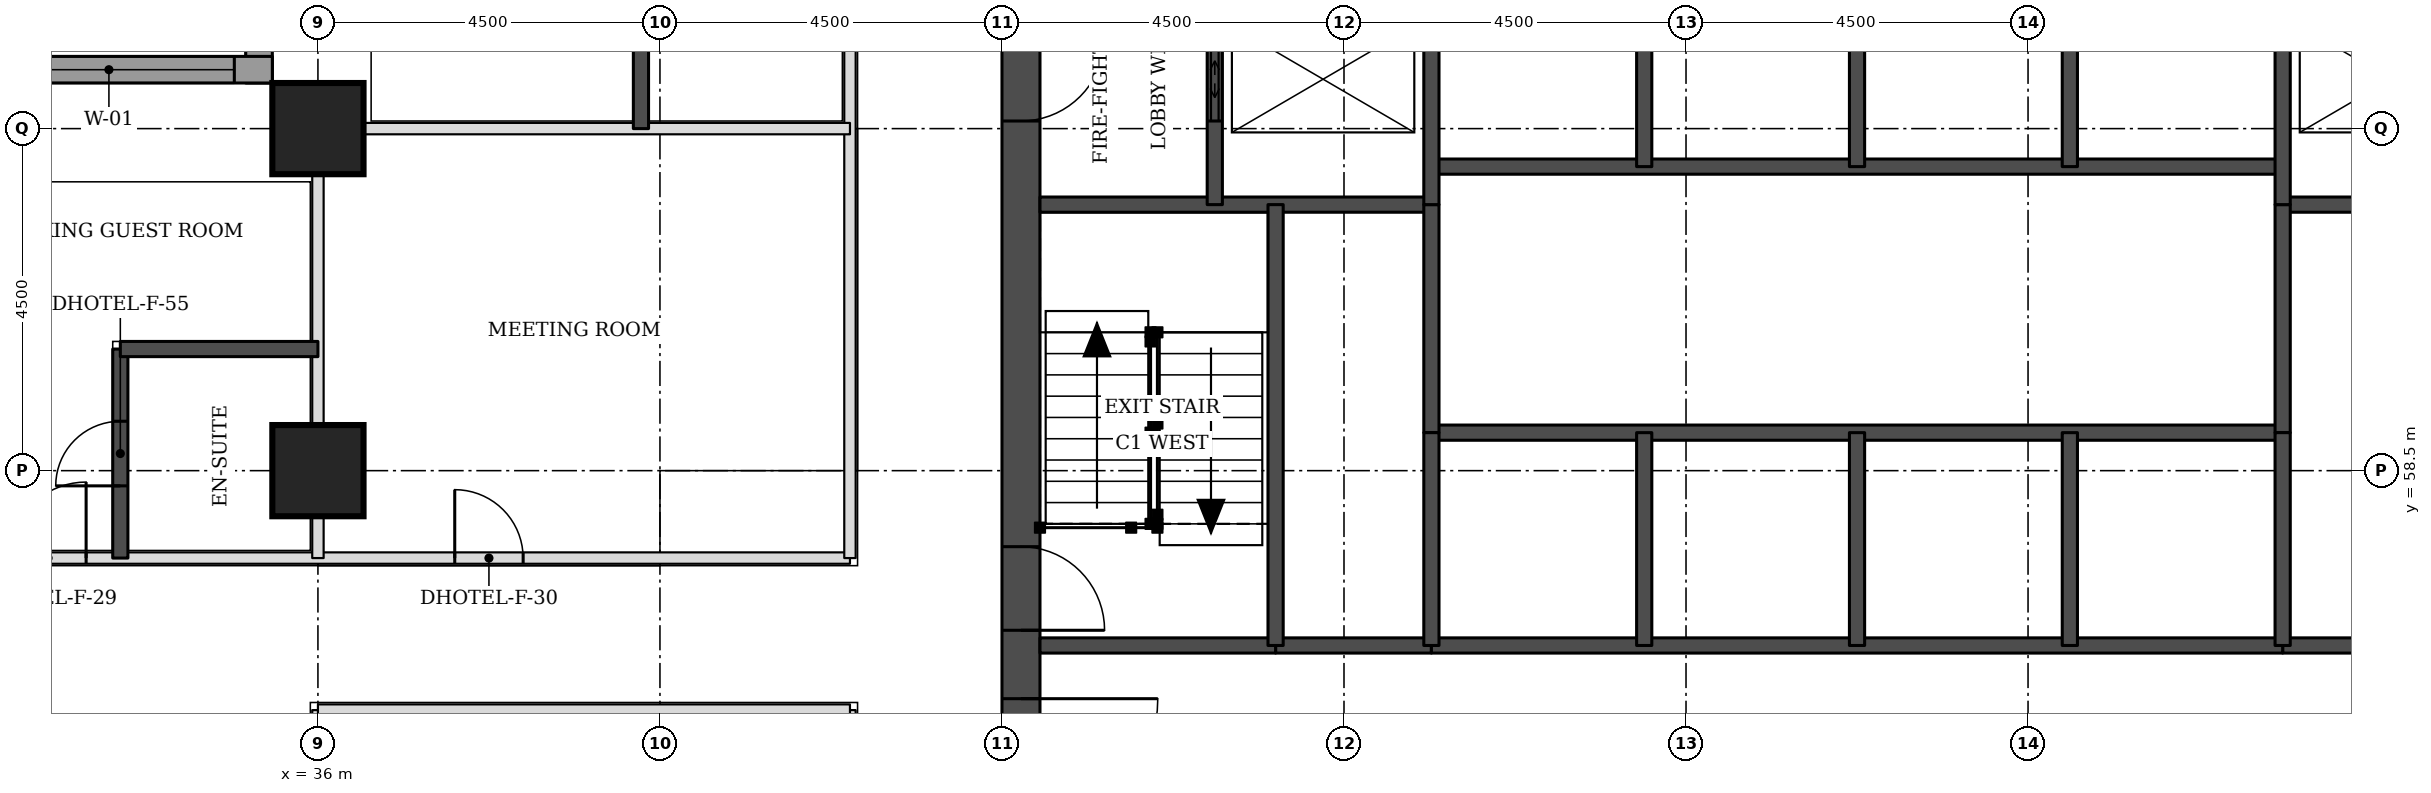
"""IFC4 building model, lengths in metres.
Left out: names, types, materials, properties, quantities, classifications, styles, units other than length and angle.
Written with IfcOpenShell. Run it as: python <this file> out.ifc"""

import sys

from ifc_helpers import new_model, si_unit, direction, frame, frame_2d, origin, origin_2d, place, context, subcontext, project, spatial, rectangle, extrude, element, fill, save


model = new_model("IFC4")
c1 = context("Model", 3, precision=1e-05, world=origin(), true_north=direction((0.0, 1.0)))
c2 = subcontext(c1, "Body", "Model", "MODEL_VIEW")
j1 = project(units=[si_unit("LENGTHUNIT", "METRE"), si_unit("PLANEANGLEUNIT", "RADIAN")], contexts=[c1])
p1 = place(None, origin())
s1 = spatial("IfcSite", under=j1, at=p1, CompositionType="ELEMENT")
p2 = place(p1, origin())
s2 = spatial("IfcBuilding", under=s1, at=p2, CompositionType="ELEMENT")
p3 = place(p2, frame((0.0, 0.0, 42.9)))
s3 = spatial("IfcBuildingStorey", under=s2, at=p3, CompositionType="ELEMENT", Elevation=42.9)
for number, where, z_axis, x_axis in (
    (1, (36.0, 58.5, 0.0), (0.0, 0.0, 1.0), (1.0, 0.0, 0.0)),
    (2, (36.0, 63.0, 0.0), (0.0, 0.0, 1.0), (1.0, 0.0, 0.0)),
):
    element("IfcColumn", number, at=place(p3, frame(where, z_axis=z_axis, x_axis=x_axis)), inside=s3, PredefinedType="COLUMN", context=c2, shape_type="SweptSolid", body=[
        extrude(rectangle(XDim=1.2, YDim=1.2, at=origin_2d()), origin(), (0.0, 0.0, 1.0), 3.3),
    ])
p4 = place(p3, frame((45.25, 49.5, 0.0), z_axis=(0.0, 0.0, 1.0), x_axis=(0.0, 1.0, 0.0)))
e3 = element("IfcWall", 3, at=p4, inside=s3, PredefinedType="SHEAR", context=c2, shape_type="SweptSolid", body=[
    extrude(rectangle(XDim=22.5, YDim=0.5, at=frame_2d((11.25, 0.0))), origin(), (0.0, 0.0, 1.0), 3.3),
])
p5 = place(p4, frame((4.2, 0.0, 0.0)))
e4 = element("IfcOpeningElement", 4, at=p5, cuts=e3, PredefinedType="OPENING", context=c2, shape_type="SweptSolid", body=[
    extrude(rectangle(XDim=1.8, YDim=2.1, at=frame_2d((0.9, 1.05))), frame((0.0, 0.26, 0.0), z_axis=(0.0, -1.0, 0.0), x_axis=(1.0, 0.0, 0.0)), (0.0, 0.0, 1.0), 0.52),
])
p6 = place(p4, frame((6.9, 0.0, 0.0)))
e5 = element("IfcOpeningElement", 5, at=p6, cuts=e3, PredefinedType="OPENING", context=c2, shape_type="SweptSolid", body=[
    extrude(rectangle(XDim=1.1, YDim=2.1, at=frame_2d((0.55, 1.05))), frame((0.0, 0.26, 0.0), z_axis=(0.0, -1.0, 0.0), x_axis=(1.0, 0.0, 0.0)), (0.0, 0.0, 1.0), 0.52),
])
p7 = place(p4, frame((13.6, 0.0, 0.0)))
e6 = element("IfcOpeningElement", 6, at=p7, cuts=e3, PredefinedType="OPENING", context=c2, shape_type="SweptSolid", body=[
    extrude(rectangle(XDim=1.1, YDim=2.1, at=frame_2d((0.55, 1.05))), frame((0.0, 0.26, 0.0), z_axis=(0.0, -1.0, 0.0), x_axis=(1.0, 0.0, 0.0)), (0.0, 0.0, 1.0), 0.52),
])
p8 = place(p4, frame((16.5, 0.0, 0.0)))
e7 = element("IfcOpeningElement", 7, at=p8, cuts=e3, PredefinedType="OPENING", context=c2, shape_type="SweptSolid", body=[
    extrude(rectangle(XDim=1.8, YDim=2.1, at=frame_2d((0.9, 1.05))), frame((0.0, 0.26, 0.0), z_axis=(0.0, -1.0, 0.0), x_axis=(1.0, 0.0, 0.0)), (0.0, 0.0, 1.0), 0.52),
])
p9 = place(p3, frame((35.225, 76.894, 0.0), z_axis=(0.0, 0.0, 1.0), x_axis=(0.0, -1.0, 0.0)))
e8 = element("IfcWall", 8, at=p9, inside=s3, PredefinedType="STANDARD", context=c2, shape_type="SweptSolid", body=[
    extrude(rectangle(XDim=13.293, YDim=0.35, at=frame_2d((6.647, 0.0))), origin(), (0.0, 0.0, 1.0), 3.055),
])
p10 = place(p9, frame((9.493, 0.0, 0.8)))
e9 = element("IfcOpeningElement", 9, at=p10, cuts=e8, PredefinedType="OPENING", context=c2, shape_type="SweptSolid", body=[
    extrude(rectangle(XDim=3.3, YDim=1.5, at=frame_2d((1.65, 0.75))), frame((0.0, 0.185, 0.0), z_axis=(0.0, -1.0, 0.0), x_axis=(1.0, 0.0, 0.0)), (0.0, 0.0, 1.0), 0.37),
])
p11 = place(p3, frame((35.4, 63.775, 0.0), z_axis=(0.0, 0.0, 1.0), x_axis=(-1.0, 0.0, 0.0)))
e10 = element("IfcWall", 10, at=p11, inside=s3, PredefinedType="STANDARD", context=c2, shape_type="SweptSolid", body=[
    extrude(rectangle(XDim=17.793, YDim=0.35, at=frame_2d((8.897, 0.0))), origin(), (0.0, 0.0, 1.0), 3.055),
])
p12 = place(p11, frame((0.5, 0.0, 0.8)))
e11 = element("IfcOpeningElement", 11, at=p12, cuts=e10, PredefinedType="OPENING", context=c2, shape_type="SweptSolid", body=[
    extrude(rectangle(XDim=3.3, YDim=1.5, at=frame_2d((1.65, 0.75))), frame((0.0, 0.185, 0.0), z_axis=(0.0, -1.0, 0.0), x_axis=(1.0, 0.0, 0.0)), (0.0, 0.0, 1.0), 0.37),
])
p13 = place(p11, frame((9.0, 0.0, 0.8)))
e12 = element("IfcOpeningElement", 12, at=p13, cuts=e10, PredefinedType="OPENING", context=c2, shape_type="SweptSolid", body=[
    extrude(rectangle(XDim=3.3, YDim=1.5, at=frame_2d((1.65, 0.75))), frame((0.0, 0.185, 0.0), z_axis=(0.0, -1.0, 0.0), x_axis=(1.0, 0.0, 0.0)), (0.0, 0.0, 1.0), 0.37),
])
p14 = place(p3, frame((43.0, 47.5, 0.0), z_axis=(0.0, 0.0, 1.0), x_axis=(0.0, 1.0, 0.0)))
e13 = element("IfcWall", 13, at=p14, inside=s3, PredefinedType="PARTITIONING", context=c2, shape_type="SweptSolid", body=[
    extrude(rectangle(XDim=7.85, YDim=0.15, at=frame_2d((3.925, 0.0))), origin(), (0.0, 0.0, 1.0), 3.08),
])
p15 = place(p14, frame((3.475, 0.0, 0.0)))
e14 = element("IfcOpeningElement", 14, at=p15, cuts=e13, PredefinedType="OPENING", context=c2, shape_type="SweptSolid", body=[
    extrude(rectangle(XDim=0.9, YDim=2.1, at=frame_2d((0.45, 1.05))), frame((0.0, 0.085, 0.0), z_axis=(0.0, -1.0, 0.0), x_axis=(1.0, 0.0, 0.0)), (0.0, 0.0, 1.0), 0.17),
])
p16 = place(p3, frame((36.0, 54.05, 0.0), z_axis=(0.0, 0.0, 1.0), x_axis=(0.0, 1.0, 0.0)))
e15 = element("IfcWall", 15, at=p16, inside=s3, PredefinedType="PARTITIONING", context=c2, shape_type="SweptSolid", body=[
    extrude(rectangle(XDim=1.3, YDim=0.15, at=frame_2d((0.65, 0.0))), origin(), (0.0, 0.0, 1.0), 2.33),
])
p17 = place(p3, frame((36.0, 55.35, 0.0), z_axis=(0.0, 0.0, 1.0), x_axis=(1.0, 0.0, 0.0)))
e16 = element("IfcWall", 16, at=p17, inside=s3, PredefinedType="PARTITIONING", context=c2, shape_type="SweptSolid", body=[
    extrude(rectangle(XDim=7.0, YDim=0.15, at=frame_2d((3.5, 0.0))), origin(), (0.0, 0.0, 1.0), 3.08),
])
p18 = place(p3, frame((29.38, 57.35, 0.0), z_axis=(0.0, 0.0, 1.0), x_axis=(1.0, 0.0, 0.0)))
e17 = element("IfcWall", 17, at=p18, inside=s3, PredefinedType="PARTITIONING", context=c2, shape_type="SweptSolid", body=[
    extrude(rectangle(XDim=13.62, YDim=0.15, at=frame_2d((6.81, 0.0))), origin(), (0.0, 0.0, 1.0), 3.08),
])
p19 = place(p18, frame((2.57, 0.0, 0.0)))
e18 = element("IfcOpeningElement", 18, at=p19, cuts=e17, PredefinedType="OPENING", context=c2, shape_type="SweptSolid", body=[
    extrude(rectangle(XDim=1.0, YDim=2.1, at=frame_2d((0.5, 1.05))), frame((0.0, 0.085, 0.0), z_axis=(0.0, -1.0, 0.0), x_axis=(1.0, 0.0, 0.0)), (0.0, 0.0, 1.0), 0.17),
])
p20 = place(p18, frame((8.42, 0.0, 0.0)))
e19 = element("IfcOpeningElement", 19, at=p20, cuts=e17, PredefinedType="OPENING", context=c2, shape_type="SweptSolid", body=[
    extrude(rectangle(XDim=0.9, YDim=2.1, at=frame_2d((0.45, 1.05))), frame((0.0, 0.085, 0.0), z_axis=(0.0, -1.0, 0.0), x_axis=(1.0, 0.0, 0.0)), (0.0, 0.0, 1.0), 0.17),
])
p21 = place(p3, frame((43.0, 57.35, 0.0), z_axis=(0.0, 0.0, 1.0), x_axis=(0.0, 1.0, 0.0)))
e20 = element("IfcWall", 20, at=p21, inside=s3, PredefinedType="PARTITIONING", context=c2, shape_type="SweptSolid", body=[
    extrude(rectangle(XDim=16.65, YDim=0.15, at=frame_2d((8.325, 0.0))), origin(), (0.0, 0.0, 1.0), 3.08),
])
p22 = place(p21, frame((8.45, 0.0, 0.0)))
e21 = element("IfcOpeningElement", 21, at=p22, cuts=e20, PredefinedType="OPENING", context=c2, shape_type="SweptSolid", body=[
    extrude(rectangle(XDim=1.0, YDim=2.1, at=frame_2d((0.5, 1.05))), frame((0.0, 0.085, 0.0), z_axis=(0.0, -1.0, 0.0), x_axis=(1.0, 0.0, 0.0)), (0.0, 0.0, 1.0), 0.17),
])
p23 = place(p21, frame((10.6, 0.0, 0.0)))
e22 = element("IfcOpeningElement", 22, at=p23, cuts=e20, PredefinedType="OPENING", context=c2, shape_type="SweptSolid", body=[
    extrude(rectangle(XDim=1.0, YDim=2.1, at=frame_2d((0.5, 1.05))), frame((0.0, 0.085, 0.0), z_axis=(0.0, -1.0, 0.0), x_axis=(1.0, 0.0, 0.0)), (0.0, 0.0, 1.0), 0.17),
])
p24 = place(p21, frame((15.203, 0.0, 0.0)))
e23 = element("IfcOpeningElement", 23, at=p24, cuts=e20, PredefinedType="OPENING", context=c2, shape_type="SweptSolid", body=[
    extrude(rectangle(XDim=1.0, YDim=2.1, at=frame_2d((0.5, 1.05))), frame((0.0, 0.085, 0.0), z_axis=(0.0, -1.0, 0.0), x_axis=(1.0, 0.0, 0.0)), (0.0, 0.0, 1.0), 0.17),
])
p25 = place(p3, frame((33.4, 57.35, 0.0), z_axis=(0.0, 0.0, 1.0), x_axis=(0.0, 1.0, 0.0)))
e24 = element("IfcWall", 24, at=p25, inside=s3, PredefinedType="SOLIDWALL", context=c2, shape_type="SweptSolid", body=[
    extrude(rectangle(XDim=2.75, YDim=0.2, at=frame_2d((1.375, 0.0))), origin(), (0.0, 0.0, 1.0), 3.08),
])
p26 = place(p25, frame((0.95, 0.0, 0.0)))
e25 = element("IfcOpeningElement", 25, at=p26, cuts=e24, PredefinedType="OPENING", context=c2, shape_type="SweptSolid", body=[
    extrude(rectangle(XDim=0.85, YDim=2.1, at=frame_2d((0.425, 1.05))), frame((0.0, 0.11, 0.0), z_axis=(0.0, -1.0, 0.0), x_axis=(1.0, 0.0, 0.0)), (0.0, 0.0, 1.0), 0.22),
])
p27 = place(p3, frame((33.4, 60.1, 0.0), z_axis=(0.0, 0.0, 1.0), x_axis=(1.0, 0.0, 0.0)))
e26 = element("IfcWall", 26, at=p27, inside=s3, PredefinedType="SOLIDWALL", context=c2, shape_type="SweptSolid", body=[
    extrude(rectangle(XDim=2.6, YDim=0.2, at=frame_2d((1.3, 0.0))), origin(), (0.0, 0.0, 1.0), 3.08),
])
p28 = place(p3, frame((40.25, 63.0, 0.0), z_axis=(0.0, 0.0, 1.0), x_axis=(0.0, 1.0, 0.0)))
e27 = element("IfcWall", 27, at=p28, inside=s3, PredefinedType="SOLIDWALL", context=c2, shape_type="SweptSolid", body=[
    extrude(rectangle(XDim=2.1, YDim=0.2, at=frame_2d((1.05, 0.0))), origin(), (0.0, 0.0, 1.0), 3.08),
])
p29 = place(p3, frame((36.0, 57.35, 0.0), z_axis=(0.0, 0.0, 1.0), x_axis=(0.0, 1.0, 0.0)))
e28 = element("IfcWall", 28, at=p29, inside=s3, PredefinedType="PARTITIONING", context=c2, shape_type="SweptSolid", body=[
    extrude(rectangle(XDim=5.05, YDim=0.15, at=frame_2d((2.525, 0.0))), origin(), (0.0, 0.0, 1.0), 2.33),
])
p30 = place(p3, frame((36.6, 63.0, 0.0), z_axis=(0.0, 0.0, 1.0), x_axis=(1.0, 0.0, 0.0)))
e29 = element("IfcWall", 29, at=p30, inside=s3, PredefinedType="PARTITIONING", context=c2, shape_type="SweptSolid", body=[
    extrude(rectangle(XDim=6.4, YDim=0.15, at=frame_2d((3.2, 0.0))), origin(), (0.0, 0.0, 1.0), 3.08),
])
for number, where, z_axis, x_axis in (
    (30, (48.6, 56.2, 0.0), (0.0, 0.0, 1.0), (1.0, 0.0, 0.0)),
    (31, (61.85, 56.2, 0.0), (0.0, 0.0, 1.0), (1.0, 0.0, 0.0)),
):
    element("IfcWall", number, at=place(p3, frame(where, z_axis=z_axis, x_axis=x_axis)), inside=s3, PredefinedType="SOLIDWALL", context=c2, shape_type="SweptSolid", body=[
        extrude(rectangle(XDim=2.05, YDim=0.2, at=frame_2d((1.025, 0.0))), origin(), (0.0, 0.0, 1.0), 3.08),
    ])
p31 = place(p3, frame((45.5, 56.2, 0.0), z_axis=(0.0, 0.0, 1.0), x_axis=(1.0, 0.0, 0.0)))
e32 = element("IfcWall", 32, at=p31, inside=s3, PredefinedType="SOLIDWALL", context=c2, shape_type="SweptSolid", body=[
    extrude(rectangle(XDim=3.1, YDim=0.2, at=frame_2d((1.55, 0.0))), origin(), (0.0, 0.0, 1.0), 3.08),
])
p32 = place(p3, frame((50.65, 56.2, 0.0), z_axis=(0.0, 0.0, 1.0), x_axis=(1.0, 0.0, 0.0)))
e33 = element("IfcWall", 33, at=p32, inside=s3, PredefinedType="SOLIDWALL", context=c2, shape_type="SweptSolid", body=[
    extrude(rectangle(XDim=11.2, YDim=0.2, at=frame_2d((5.6, 0.0))), origin(), (0.0, 0.0, 1.0), 3.08),
])
p33 = place(p3, frame((50.65, 59.0, 0.0), z_axis=(0.0, 0.0, 1.0), x_axis=(1.0, 0.0, 0.0)))
e34 = element("IfcWall", 34, at=p33, inside=s3, PredefinedType="SOLIDWALL", context=c2, shape_type="SweptSolid", body=[
    extrude(rectangle(XDim=11.2, YDim=0.2, at=frame_2d((5.6, 0.0))), origin(), (0.0, 0.0, 1.0), 3.3),
])
for number, where, z_axis, x_axis in (
    (35, (45.5, 62.0, 0.0), (0.0, 0.0, 1.0), (1.0, 0.0, 0.0)),
    (36, (61.85, 62.0, 0.0), (0.0, 0.0, 1.0), (1.0, 0.0, 0.0)),
):
    element("IfcWall", number, at=place(p3, frame(where, z_axis=z_axis, x_axis=x_axis)), inside=s3, PredefinedType="SOLIDWALL", context=c2, shape_type="SweptSolid", body=[
        extrude(rectangle(XDim=5.15, YDim=0.2, at=frame_2d((2.575, 0.0))), origin(), (0.0, 0.0, 1.0), 3.08),
    ])
p34 = place(p3, frame((50.65, 62.5, 0.0), z_axis=(0.0, 0.0, 1.0), x_axis=(1.0, 0.0, 0.0)))
e37 = element("IfcWall", 37, at=p34, inside=s3, PredefinedType="SOLIDWALL", context=c2, shape_type="SweptSolid", body=[
    extrude(rectangle(XDim=11.2, YDim=0.2, at=frame_2d((5.6, 0.0))), origin(), (0.0, 0.0, 1.0), 3.3),
])
p35 = place(p3, frame((47.8, 62.0, 0.0), z_axis=(0.0, 0.0, 1.0), x_axis=(0.0, 1.0, 0.0)))
e38 = element("IfcWall", 38, at=p35, inside=s3, PredefinedType="SOLIDWALL", context=c2, shape_type="SweptSolid", body=[
    extrude(rectangle(XDim=3.3, YDim=0.2, at=frame_2d((1.65, 0.0))), origin(), (0.0, 0.0, 1.0), 3.08),
])
p36 = place(p35, frame((1.1, 0.0, 0.0)))
e39 = element("IfcOpeningElement", 39, at=p36, cuts=e38, PredefinedType="OPENING", context=c2, shape_type="SweptSolid", body=[
    extrude(rectangle(XDim=1.1, YDim=2.1, at=frame_2d((0.55, 1.05))), frame((0.0, 0.11, 0.0), z_axis=(0.0, -1.0, 0.0), x_axis=(1.0, 0.0, 0.0)), (0.0, 0.0, 1.0), 0.22),
])
p37 = place(p3, frame((48.6, 56.2, 0.0), z_axis=(0.0, 0.0, 1.0), x_axis=(0.0, 1.0, 0.0)))
e40 = element("IfcWall", 40, at=p37, inside=s3, PredefinedType="SOLIDWALL", context=c2, shape_type="SweptSolid", body=[
    extrude(rectangle(XDim=5.8, YDim=0.2, at=frame_2d((2.9, 0.0))), origin(), (0.0, 0.0, 1.0), 3.08),
])
p38 = place(p3, frame((50.65, 59.0, 0.0), z_axis=(0.0, 0.0, 1.0), x_axis=(0.0, 1.0, 0.0)))
e41 = element("IfcWall", 41, at=p38, inside=s3, PredefinedType="SOLIDWALL", context=c2, shape_type="SweptSolid", body=[
    extrude(rectangle(XDim=3.0, YDim=0.2, at=frame_2d((1.5, 0.0))), origin(), (0.0, 0.0, 1.0), 3.3),
])
p39 = place(p3, frame((50.65, 56.2, 0.0), z_axis=(0.0, 0.0, 1.0), x_axis=(0.0, 1.0, 0.0)))
e42 = element("IfcWall", 42, at=p39, inside=s3, PredefinedType="SOLIDWALL", context=c2, shape_type="SweptSolid", body=[
    extrude(rectangle(XDim=2.8, YDim=0.2, at=frame_2d((1.4, 0.0))), origin(), (0.0, 0.0, 1.0), 3.08),
])
p40 = place(p3, frame((50.65, 62.0, 0.0), z_axis=(0.0, 0.0, 1.0), x_axis=(0.0, 1.0, 0.0)))
e43 = element("IfcWall", 43, at=p40, inside=s3, PredefinedType="SOLIDWALL", context=c2, shape_type="SweptSolid", body=[
    extrude(rectangle(XDim=3.3, YDim=0.2, at=frame_2d((1.65, 0.0))), origin(), (0.0, 0.0, 1.0), 3.08),
])
for number, where, z_axis, x_axis in (
    (44, (53.45, 56.2, 0.0), (0.0, 0.0, 1.0), (0.0, 1.0, 0.0)),
    (45, (53.45, 62.5, 0.0), (0.0, 0.0, 1.0), (0.0, 1.0, 0.0)),
    (46, (56.25, 56.2, 0.0), (0.0, 0.0, 1.0), (0.0, 1.0, 0.0)),
    (47, (56.25, 62.5, 0.0), (0.0, 0.0, 1.0), (0.0, 1.0, 0.0)),
    (48, (59.05, 56.2, 0.0), (0.0, 0.0, 1.0), (0.0, 1.0, 0.0)),
    (49, (59.05, 62.5, 0.0), (0.0, 0.0, 1.0), (0.0, 1.0, 0.0)),
):
    element("IfcWall", number, at=place(p3, frame(where, z_axis=z_axis, x_axis=x_axis)), inside=s3, PredefinedType="SOLIDWALL", context=c2, shape_type="SweptSolid", body=[
        extrude(rectangle(XDim=2.8, YDim=0.2, at=frame_2d((1.4, 0.0))), origin(), (0.0, 0.0, 1.0), 3.08),
    ])
p41 = place(p3, frame((61.85, 59.0, 0.0), z_axis=(0.0, 0.0, 1.0), x_axis=(0.0, 1.0, 0.0)))
e50 = element("IfcWall", 50, at=p41, inside=s3, PredefinedType="SOLIDWALL", context=c2, shape_type="SweptSolid", body=[
    extrude(rectangle(XDim=3.0, YDim=0.2, at=frame_2d((1.5, 0.0))), origin(), (0.0, 0.0, 1.0), 3.3),
])
p42 = place(p3, frame((61.85, 56.2, 0.0), z_axis=(0.0, 0.0, 1.0), x_axis=(0.0, 1.0, 0.0)))
e51 = element("IfcWall", 51, at=p42, inside=s3, PredefinedType="SOLIDWALL", context=c2, shape_type="SweptSolid", body=[
    extrude(rectangle(XDim=2.8, YDim=0.2, at=frame_2d((1.4, 0.0))), origin(), (0.0, 0.0, 1.0), 3.08),
])
p43 = place(p3, frame((61.85, 62.0, 0.0), z_axis=(0.0, 0.0, 1.0), x_axis=(0.0, 1.0, 0.0)))
e52 = element("IfcWall", 52, at=p43, inside=s3, PredefinedType="SOLIDWALL", context=c2, shape_type="SweptSolid", body=[
    extrude(rectangle(XDim=3.3, YDim=0.2, at=frame_2d((1.65, 0.0))), origin(), (0.0, 0.0, 1.0), 3.08),
])
p44 = place(p12, origin())
e53 = element("IfcWindow", 53, at=p44, inside=s3, PartitioningType="SINGLE_PANEL", PredefinedType="WINDOW", context=c2, shape_type="SweptSolid", body=[
    extrude(rectangle(XDim=3.3, YDim=1.5, at=frame_2d((1.65, 0.75))), frame((0.0, 0.085, 0.0), z_axis=(0.0, -1.0, 0.0), x_axis=(1.0, 0.0, 0.0)), (0.0, 0.0, 1.0), 0.06),
])
fill(e11, e53)
p45 = place(p19, origin())
e54 = element("IfcDoor", 54, at=p45, inside=s3, OperationType="SINGLE_SWING_RIGHT", PredefinedType="DOOR", context=c2, shape_type="SweptSolid", body=[
    extrude(rectangle(XDim=1.0, YDim=2.1, at=frame_2d((0.5, 1.05))), frame((0.0, 0.025, 0.0), z_axis=(0.0, -1.0, 0.0), x_axis=(1.0, 0.0, 0.0)), (0.0, 0.0, 1.0), 0.05),
])
fill(e18, e54)
p46 = place(p26, origin())
e55 = element("IfcDoor", 55, at=p46, inside=s3, OperationType="SINGLE_SWING_LEFT", PredefinedType="DOOR", context=c2, shape_type="SweptSolid", body=[
    extrude(rectangle(XDim=0.85, YDim=2.1, at=frame_2d((0.425, 1.05))), frame((0.0, 0.025, 0.0), z_axis=(0.0, -1.0, 0.0), x_axis=(1.0, 0.0, 0.0)), (0.0, 0.0, 1.0), 0.05),
])
fill(e25, e55)
p47 = place(p20, origin())
e56 = element("IfcDoor", 56, at=p47, inside=s3, OperationType="SINGLE_SWING_LEFT", PredefinedType="DOOR", context=c2, shape_type="SweptSolid", body=[
    extrude(rectangle(XDim=0.9, YDim=2.1, at=frame_2d((0.45, 1.05))), frame((0.0, 0.025, 0.0), z_axis=(0.0, -1.0, 0.0), x_axis=(1.0, 0.0, 0.0)), (0.0, 0.0, 1.0), 0.05),
])
fill(e19, e56)
p48 = place(p36, origin())
e57 = element("IfcDoor", 57, at=p48, inside=s3, OperationType="DOUBLE_DOOR_SLIDING", PredefinedType="DOOR", context=c2, shape_type="SweptSolid", body=[
    extrude(rectangle(XDim=1.1, YDim=2.1, at=frame_2d((0.55, 1.05))), frame((0.0, 0.025, 0.0), z_axis=(0.0, -1.0, 0.0), x_axis=(1.0, 0.0, 0.0)), (0.0, 0.0, 1.0), 0.05),
])
fill(e39, e57)
p49 = place(p5, frame((1.8, 0.0, 0.0), z_axis=(0.0, 0.0, 1.0), x_axis=(-1.0, 0.0, 0.0)))
e58 = element("IfcDoor", 58, at=p49, inside=s3, OperationType="SINGLE_SWING_LEFT", PredefinedType="DOOR", context=c2, shape_type="SweptSolid", body=[
    extrude(rectangle(XDim=1.8, YDim=2.1, at=frame_2d((0.9, 1.05))), frame((0.0, 0.025, 0.0), z_axis=(0.0, -1.0, 0.0), x_axis=(1.0, 0.0, 0.0)), (0.0, 0.0, 1.0), 0.05),
])
fill(e4, e58)
p50 = place(p6, frame((1.1, 0.0, 0.0), z_axis=(0.0, 0.0, 1.0), x_axis=(-1.0, 0.0, 0.0)))
e59 = element("IfcDoor", 59, at=p50, inside=s3, OperationType="SINGLE_SWING_RIGHT", PredefinedType="DOOR", context=c2, shape_type="SweptSolid", body=[
    extrude(rectangle(XDim=1.1, YDim=2.1, at=frame_2d((0.55, 1.05))), frame((0.0, 0.025, 0.0), z_axis=(0.0, -1.0, 0.0), x_axis=(1.0, 0.0, 0.0)), (0.0, 0.0, 1.0), 0.05),
])
fill(e5, e59)
p51 = place(p7, frame((1.1, 0.0, 0.0), z_axis=(0.0, 0.0, 1.0), x_axis=(-1.0, 0.0, 0.0)))
e60 = element("IfcDoor", 60, at=p51, inside=s3, OperationType="SINGLE_SWING_LEFT", PredefinedType="DOOR", context=c2, shape_type="SweptSolid", body=[
    extrude(rectangle(XDim=1.1, YDim=2.1, at=frame_2d((0.55, 1.05))), frame((0.0, 0.025, 0.0), z_axis=(0.0, -1.0, 0.0), x_axis=(1.0, 0.0, 0.0)), (0.0, 0.0, 1.0), 0.05),
])
fill(e6, e60)
save(model, sys.argv[1])
